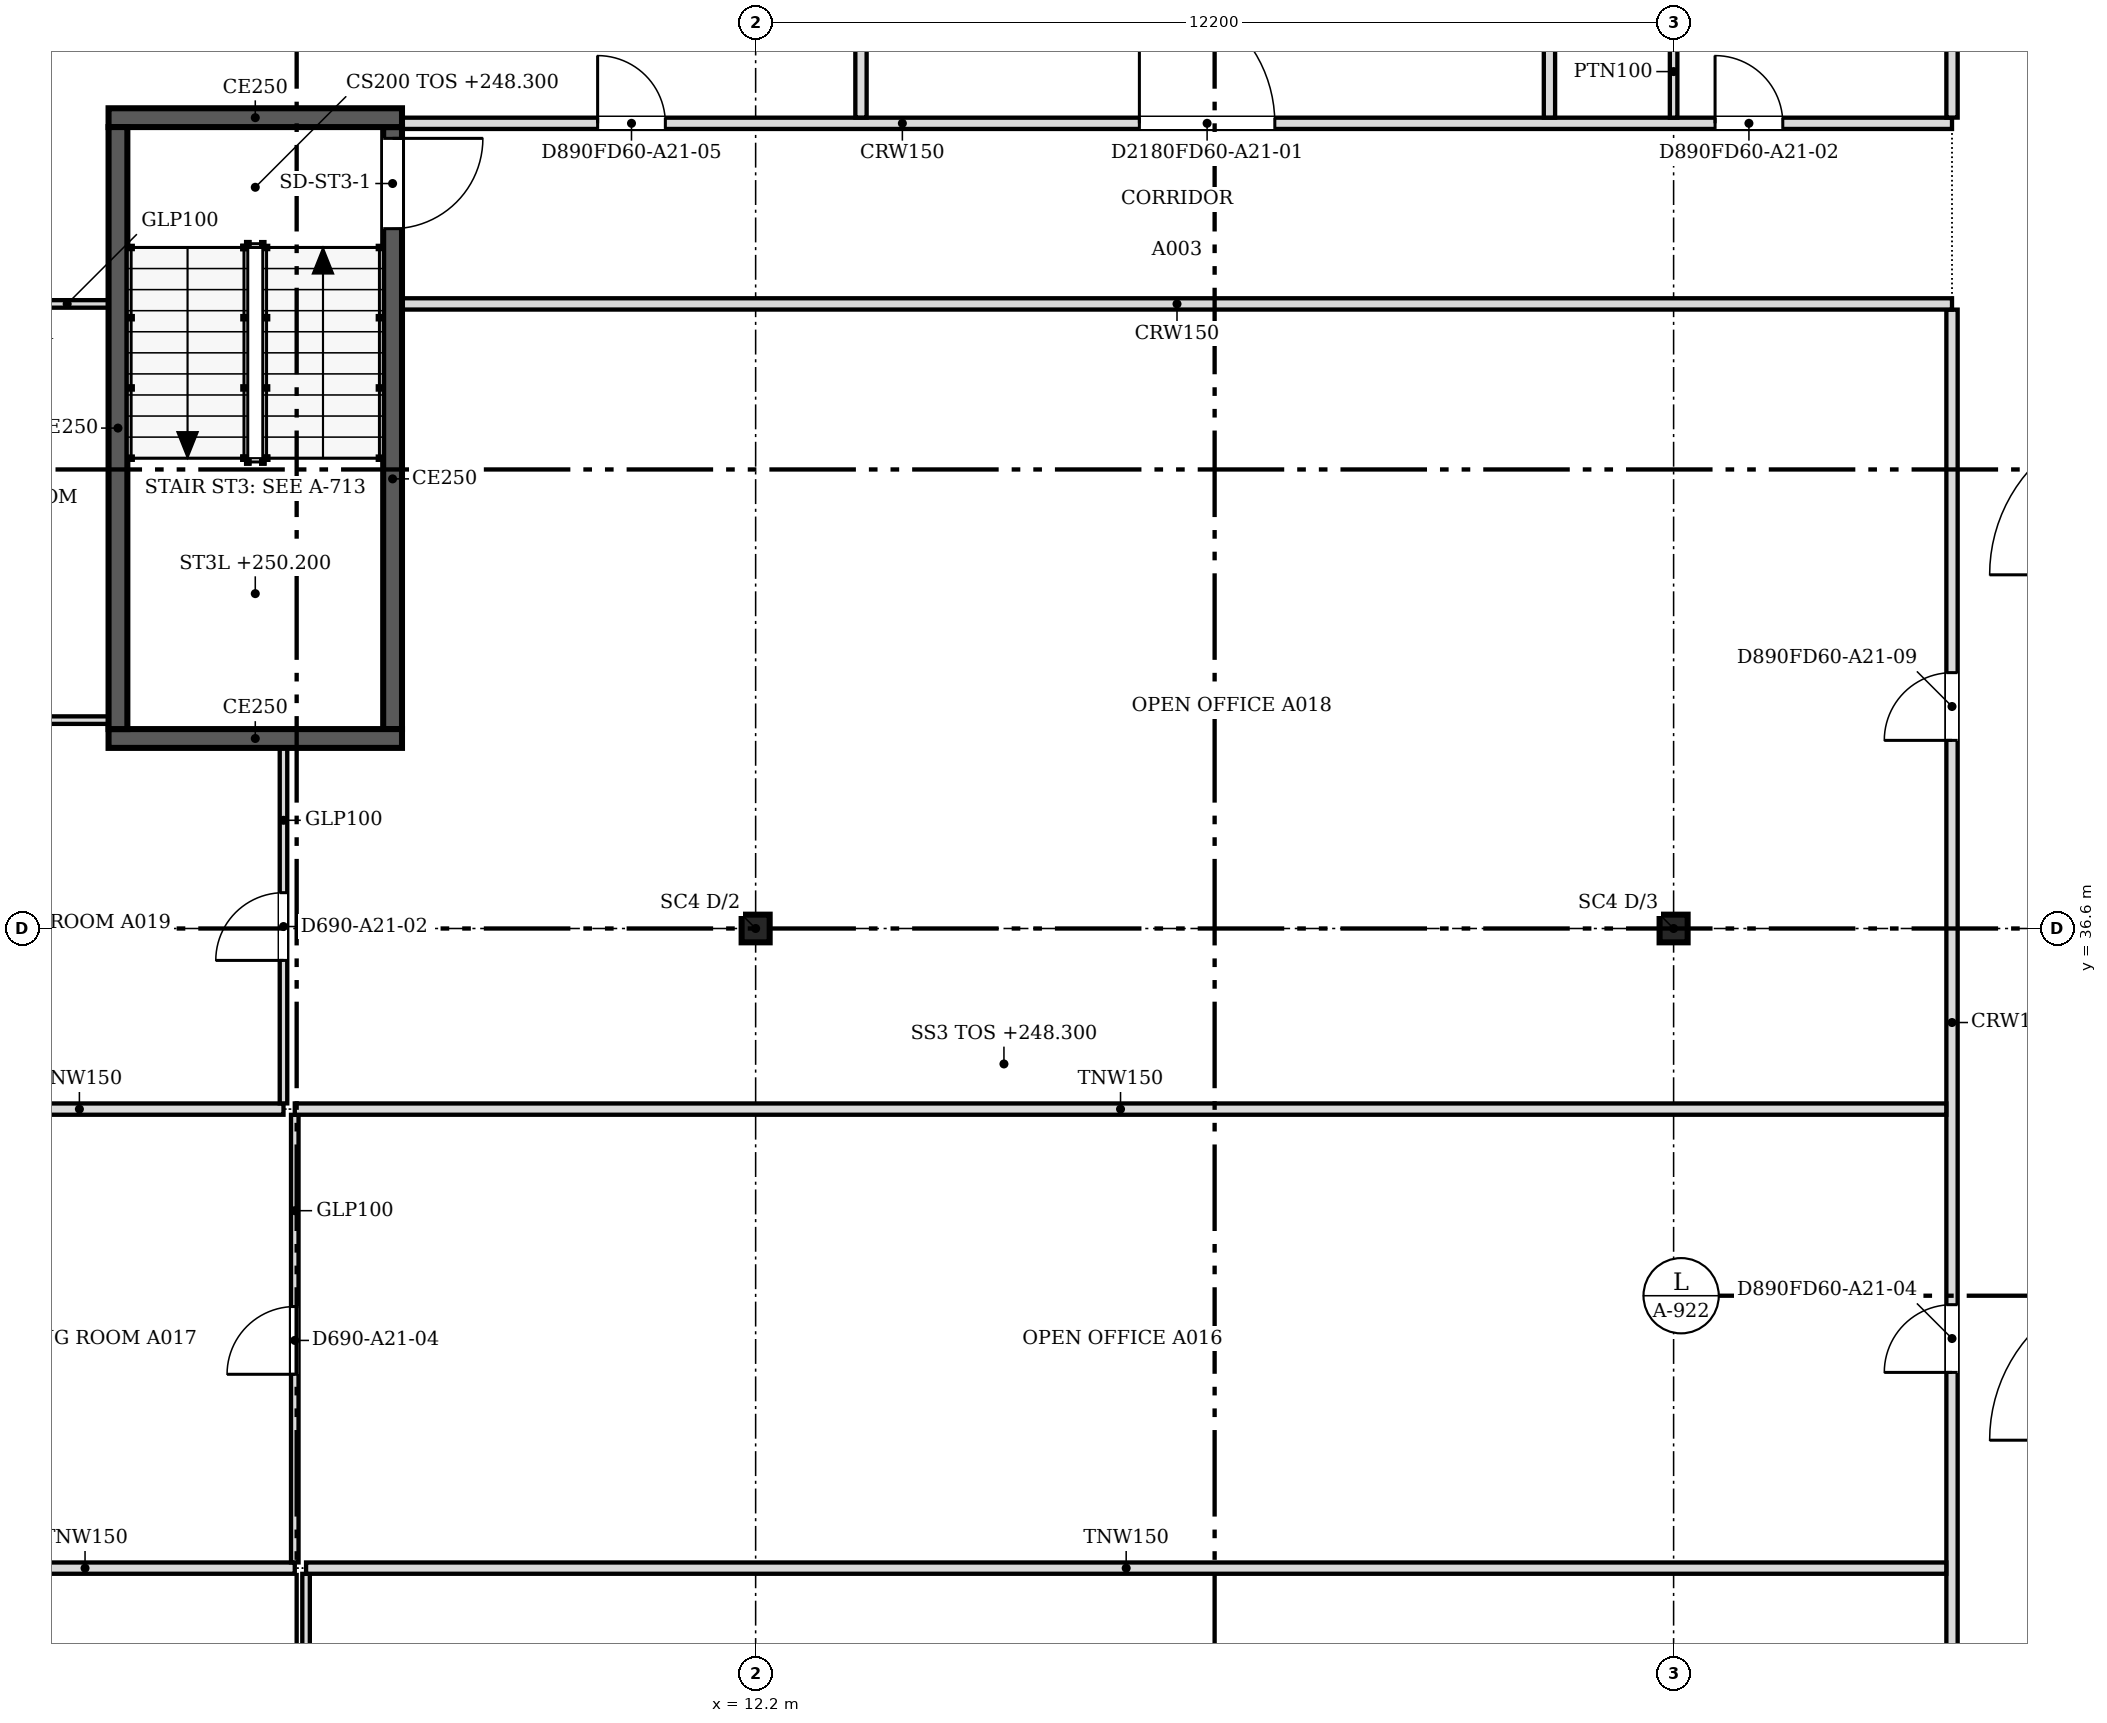
"""IFC4 building model, lengths in metres.
Left out: names, types, materials, properties, quantities, classifications, styles, units other than length and angle.
Written with IfcOpenShell. Run it as: python <this file> out.ifc"""

import sys

from ifc_helpers import new_model, si_unit, direction, frame, frame_2d, origin, origin_2d, place, context, subcontext, project, spatial, rectangle, i_section, extrude, source, transform, mapped, element, fill, save


model = new_model("IFC4")
c1 = context("Model", 3, precision=1e-05, world=origin(), true_north=direction((0.0, 1.0)))
c2 = subcontext(c1, "Body", "Model", "MODEL_VIEW")
j1 = project(units=[si_unit("LENGTHUNIT", "METRE"), si_unit("PLANEANGLEUNIT", "RADIAN")], contexts=[c1])
p1 = place(None, origin())
s1 = spatial("IfcSite", under=j1, at=p1, CompositionType="ELEMENT")
p2 = place(p1, origin())
s2 = spatial("IfcBuilding", under=s1, at=p2, CompositionType="ELEMENT")
p3 = place(p2, frame((0.0, 0.0, 248.3)))
s3 = spatial("IfcBuildingStorey", under=s2, at=p3, CompositionType="ELEMENT", Elevation=248.3)
for number, where, z_axis, x_axis in (
    (1, (12.2, 36.6, 0.0), (0.0, 0.0, 1.0), (1.0, 0.0, 0.0)),
    (2, (24.4, 36.6, 0.0), (0.0, 0.0, 1.0), (1.0, 0.0, 0.0)),
):
    element("IfcColumn", number, at=place(p3, frame(where, z_axis=z_axis, x_axis=x_axis)), inside=s3, PredefinedType="COLUMN", context=c2, shape_type="SweptSolid", body=[
        extrude(i_section(OverallWidth=0.373, OverallDepth=0.368, WebThickness=0.015, FlangeThickness=0.024, at=origin_2d()), origin(), (0.0, 0.0, 1.0), 3.6),
    ])
p4 = place(p3, frame((7.5, 39.125, 0.0), z_axis=(0.0, 0.0, 1.0), x_axis=(-1.0, 0.0, 0.0)))
e3 = element("IfcWall", 3, at=p4, inside=s3, PredefinedType="SOLIDWALL", context=c2, shape_type="SweptSolid", body=[
    extrude(rectangle(XDim=3.9, YDim=0.25, at=frame_2d((1.95, 0.0))), origin(), (0.0, 0.0, 1.0), 3.8),
])
p5 = place(p3, frame((3.725, 39.25, 0.0), z_axis=(0.0, 0.0, 1.0), x_axis=(0.0, 1.0, 0.0)))
e4 = element("IfcWall", 4, at=p5, inside=s3, PredefinedType="SOLIDWALL", context=c2, shape_type="SweptSolid", body=[
    extrude(rectangle(XDim=8.0, YDim=0.25, at=frame_2d((4.0, 0.0))), origin(), (0.0, 0.0, 1.0), 3.8),
])
p6 = place(p3, frame((3.6, 47.375, 0.0), z_axis=(0.0, 0.0, 1.0), x_axis=(1.0, 0.0, 0.0)))
e5 = element("IfcWall", 5, at=p6, inside=s3, PredefinedType="SOLIDWALL", context=c2, shape_type="SweptSolid", body=[
    extrude(rectangle(XDim=3.9, YDim=0.25, at=frame_2d((1.95, 0.0))), origin(), (0.0, 0.0, 1.0), 3.8),
])
p7 = place(p3, frame((7.375, 47.25, 0.0), z_axis=(0.0, 0.0, 1.0), x_axis=(0.0, -1.0, 0.0)))
e6 = element("IfcWall", 6, at=p7, inside=s3, PredefinedType="SOLIDWALL", context=c2, shape_type="SweptSolid", body=[
    extrude(rectangle(XDim=8.0, YDim=0.25, at=frame_2d((4.0, 0.0))), origin(), (0.0, 0.0, 1.0), 3.8),
])
m1 = source(origin(), c2, "Body", "SweptSolid", [
    extrude(rectangle(XDim=1.2, YDim=2.1, at=frame_2d((0.6, 1.05))), frame((0.0, 0.135, 0.0), z_axis=(0.0, -1.0, 0.0), x_axis=(1.0, 0.0, 0.0)), (0.0, 0.0, 1.0), 0.27),
])
p8 = place(p7, frame((0.15, 0.0, 0.0)))
e7 = element("IfcOpeningElement", 7, at=p8, cuts=e6, PredefinedType="OPENING", context=c2, shape_type="MappedRepresentation", body=[
    mapped(m1, transform((0.0, 0.0, 0.0), scale=1.0)),
])
p9 = place(p3, frame((6.225, 22.0, 0.0), z_axis=(0.0, 0.0, 1.0), x_axis=(0.0, 1.0, 0.0)))
e8 = element("IfcWall", 8, at=p9, inside=s3, PredefinedType="PARTITIONING", context=c2, shape_type="SweptSolid", body=[
    extrude(rectangle(XDim=6.024, YDim=0.1, at=frame_2d((3.012, 0.0))), origin(), (0.0, 0.0, 1.0), 3.067),
])
p10 = place(p3, frame((28.1, 22.076, 0.0), z_axis=(0.0, 0.0, 1.0), x_axis=(0.0, 1.0, 0.0)))
e9 = element("IfcWall", 9, at=p10, inside=s3, PredefinedType="PARTITIONING", context=c2, shape_type="SweptSolid", body=[
    extrude(rectangle(XDim=22.748, YDim=0.15, at=frame_2d((11.374, 0.0))), origin(), (0.0, 0.0, 1.0), 3.067),
])
m2 = source(origin(), c2, "Body", "SweptSolid", [
    extrude(rectangle(XDim=0.9, YDim=2.1, at=frame_2d((0.45, 1.05))), frame((0.0, 0.085, 0.0), z_axis=(0.0, -1.0, 0.0), x_axis=(1.0, 0.0, 0.0)), (0.0, 0.0, 1.0), 0.17),
])
p11 = place(p10, frame((2.6, 0.0, 0.0)))
e10 = element("IfcOpeningElement", 10, at=p11, cuts=e9, PredefinedType="OPENING", context=c2, shape_type="MappedRepresentation", body=[
    mapped(m2, transform((0.0, 0.0, 0.0), scale=1.0)),
])
p12 = place(p10, frame((8.625, 0.0, 0.0)))
e11 = element("IfcOpeningElement", 11, at=p12, cuts=e9, PredefinedType="OPENING", context=c2, shape_type="MappedRepresentation", body=[
    mapped(m2, transform((0.0, 0.0, 0.0), scale=1.0)),
])
p13 = place(p10, frame((17.024, 0.0, 0.0)))
e12 = element("IfcOpeningElement", 12, at=p13, cuts=e9, PredefinedType="OPENING", context=c2, shape_type="MappedRepresentation", body=[
    mapped(m2, transform((0.0, 0.0, 0.0), scale=1.0)),
])
p14 = place(p3, frame((0.5, 28.1, 0.0), z_axis=(0.0, 0.0, 1.0), x_axis=(1.0, 0.0, 0.0)))
e13 = element("IfcWall", 13, at=p14, inside=s3, PredefinedType="PARTITIONING", context=c2, shape_type="SweptSolid", body=[
    extrude(rectangle(XDim=5.575, YDim=0.15, at=frame_2d((2.788, 0.0))), origin(), (0.0, 0.0, 1.0), 3.067),
])
p15 = place(p3, frame((6.225, 28.1, 0.0), z_axis=(0.0, 0.0, 1.0), x_axis=(1.0, 0.0, 0.0)))
e14 = element("IfcWall", 14, at=p15, inside=s3, PredefinedType="PARTITIONING", context=c2, shape_type="SweptSolid", body=[
    extrude(rectangle(XDim=21.799, YDim=0.15, at=frame_2d((10.899, 0.0))), origin(), (0.0, 0.0, 1.0), 3.067),
])
p16 = place(p3, frame((6.075, 28.176, 0.0), z_axis=(0.0, 0.0, 1.0), x_axis=(0.0, 1.0, 0.0)))
e15 = element("IfcWall", 15, at=p16, inside=s3, PredefinedType="PARTITIONING", context=c2, shape_type="SweptSolid", body=[
    extrude(rectangle(XDim=5.948, YDim=0.1, at=frame_2d((2.974, 0.0))), origin(), (0.0, 0.0, 1.0), 3.067),
])
m3 = source(origin(), c2, "Body", "SweptSolid", [
    extrude(rectangle(XDim=0.9, YDim=2.1, at=frame_2d((0.45, 1.05))), frame((0.0, 0.06, 0.0), z_axis=(0.0, -1.0, 0.0), x_axis=(1.0, 0.0, 0.0)), (0.0, 0.0, 1.0), 0.12),
])
p17 = place(p16, frame((2.5, 0.0, 0.0)))
e16 = element("IfcOpeningElement", 16, at=p17, cuts=e15, PredefinedType="OPENING", context=c2, shape_type="MappedRepresentation", body=[
    mapped(m3, transform((0.0, 0.0, 0.0), scale=1.0)),
])
p18 = place(p3, frame((0.5, 34.2, 0.0), z_axis=(0.0, 0.0, 1.0), x_axis=(1.0, 0.0, 0.0)))
e17 = element("IfcWall", 17, at=p18, inside=s3, PredefinedType="PARTITIONING", context=c2, shape_type="SweptSolid", body=[
    extrude(rectangle(XDim=5.425, YDim=0.15, at=frame_2d((2.712, 0.0))), origin(), (0.0, 0.0, 1.0), 3.067),
])
p19 = place(p3, frame((6.075, 34.2, 0.0), z_axis=(0.0, 0.0, 1.0), x_axis=(1.0, 0.0, 0.0)))
e18 = element("IfcWall", 18, at=p19, inside=s3, PredefinedType="PARTITIONING", context=c2, shape_type="SweptSolid", body=[
    extrude(rectangle(XDim=21.949, YDim=0.15, at=frame_2d((10.975, 0.0))), origin(), (0.0, 0.0, 1.0), 3.067),
])
p20 = place(p3, frame((5.925, 34.276, 0.0), z_axis=(0.0, 0.0, 1.0), x_axis=(0.0, 1.0, 0.0)))
e19 = element("IfcWall", 19, at=p20, inside=s3, PredefinedType="PARTITIONING", context=c2, shape_type="SweptSolid", body=[
    extrude(rectangle(XDim=4.724, YDim=0.1, at=frame_2d((2.362, 0.0))), origin(), (0.0, 0.0, 1.0), 3.067),
])
p21 = place(p20, frame((1.9, 0.0, 0.0)))
e20 = element("IfcOpeningElement", 20, at=p21, cuts=e19, PredefinedType="OPENING", context=c2, shape_type="MappedRepresentation", body=[
    mapped(m3, transform((0.0, 0.0, 0.0), scale=1.0)),
])
p22 = place(p3, frame((0.5, 39.369, 0.0), z_axis=(0.0, 0.0, 1.0), x_axis=(1.0, 0.0, 0.0)))
e21 = element("IfcWall", 21, at=p22, inside=s3, PredefinedType="PARTITIONING", context=c2, shape_type="SweptSolid", body=[
    extrude(rectangle(XDim=3.1, YDim=0.1, at=frame_2d((1.55, 0.0))), origin(), (0.0, 0.0, 1.0), 3.067),
])
p23 = place(p3, frame((3.6, 44.9, 0.0), z_axis=(0.0, 0.0, 1.0), x_axis=(-1.0, 0.0, 0.0)))
e22 = element("IfcWall", 22, at=p23, inside=s3, PredefinedType="PARTITIONING", context=c2, shape_type="SweptSolid", body=[
    extrude(rectangle(XDim=3.1, YDim=0.1, at=frame_2d((1.55, 0.0))), origin(), (0.0, 0.0, 1.0), 3.067),
])
p24 = place(p23, frame((1.1, 0.0, 0.0)))
e23 = element("IfcOpeningElement", 23, at=p24, cuts=e22, PredefinedType="OPENING", context=c2, shape_type="MappedRepresentation", body=[
    mapped(m3, transform((0.0, 0.0, 0.0), scale=1.0)),
])
p25 = place(p3, frame((7.5, 44.9, 0.0), z_axis=(0.0, 0.0, 1.0), x_axis=(1.0, 0.0, 0.0)))
e24 = element("IfcWall", 24, at=p25, inside=s3, PredefinedType="PARTITIONING", context=c2, shape_type="SweptSolid", body=[
    extrude(rectangle(XDim=20.6, YDim=0.15, at=frame_2d((10.3, 0.0))), origin(), (0.0, 0.0, 1.0), 3.067),
])
p26 = place(p3, frame((7.5, 47.3, 0.0), z_axis=(0.0, 0.0, 1.0), x_axis=(1.0, 0.0, 0.0)))
e25 = element("IfcWall", 25, at=p26, inside=s3, PredefinedType="PARTITIONING", context=c2, shape_type="SweptSolid", body=[
    extrude(rectangle(XDim=20.6, YDim=0.15, at=frame_2d((10.3, 0.0))), origin(), (0.0, 0.0, 1.0), 3.067),
])
p27 = place(p26, frame((17.451, 0.0, 0.0)))
e26 = element("IfcOpeningElement", 26, at=p27, cuts=e25, PredefinedType="OPENING", context=c2, shape_type="MappedRepresentation", body=[
    mapped(m2, transform((0.0, 0.0, 0.0), scale=1.0)),
])
p28 = place(p26, frame((2.6, 0.0, 0.0)))
e27 = element("IfcOpeningElement", 27, at=p28, cuts=e25, PredefinedType="OPENING", context=c2, shape_type="MappedRepresentation", body=[
    mapped(m2, transform((0.0, 0.0, 0.0), scale=1.0)),
])
m4 = source(origin(), c2, "Body", "SweptSolid", [
    extrude(rectangle(XDim=1.8, YDim=2.1, at=frame_2d((0.9, 1.05))), frame((0.0, 0.085, 0.0), z_axis=(0.0, -1.0, 0.0), x_axis=(1.0, 0.0, 0.0)), (0.0, 0.0, 1.0), 0.17),
])
p29 = place(p26, frame((9.8, 0.0, 0.0)))
e28 = element("IfcOpeningElement", 28, at=p29, cuts=e25, PredefinedType="OPENING", context=c2, shape_type="MappedRepresentation", body=[
    mapped(m4, transform((0.0, 0.0, 0.0), scale=1.0)),
])
p30 = place(p3, frame((13.6, 47.376, 0.0), z_axis=(0.0, 0.0, 1.0), x_axis=(0.0, 1.0, 0.0)))
e29 = element("IfcWall", 29, at=p30, inside=s3, PredefinedType="PARTITIONING", context=c2, shape_type="SweptSolid", body=[
    extrude(rectangle(XDim=3.274, YDim=0.15, at=frame_2d((1.637, 0.0))), origin(), (0.0, 0.0, 1.0), 3.067),
])
p31 = place(p3, frame((22.75, 47.376, 0.0), z_axis=(0.0, 0.0, 1.0), x_axis=(0.0, 1.0, 0.0)))
e30 = element("IfcWall", 30, at=p31, inside=s3, PredefinedType="PARTITIONING", context=c2, shape_type="SweptSolid", body=[
    extrude(rectangle(XDim=3.124, YDim=0.15, at=frame_2d((1.562, 0.0))), origin(), (0.0, 0.0, 1.0), 3.067),
])
p32 = place(p3, frame((28.1, 47.376, 0.0), z_axis=(0.0, 0.0, 1.0), x_axis=(0.0, 1.0, 0.0)))
e31 = element("IfcWall", 31, at=p32, inside=s3, PredefinedType="PARTITIONING", context=c2, shape_type="SweptSolid", body=[
    extrude(rectangle(XDim=3.748, YDim=0.15, at=frame_2d((1.874, 0.0))), origin(), (0.0, 0.0, 1.0), 3.067),
])
p33 = place(p3, frame((24.4, 48.6, 0.0), z_axis=(0.0, 0.0, 1.0), x_axis=(0.0, -1.0, 0.0)))
e32 = element("IfcWall", 32, at=p33, inside=s3, PredefinedType="PARTITIONING", context=c2, shape_type="SweptSolid", body=[
    extrude(rectangle(XDim=1.225, YDim=0.1, at=frame_2d((0.613, 0.0))), origin(), (0.0, 0.0, 1.0), 3.067),
])
m5 = source(origin(), c2, "Body", "SweptSolid", [
    extrude(rectangle(XDim=1.2, YDim=2.1, at=frame_2d((0.6, 1.05))), frame((0.0, 0.025, 0.0), z_axis=(0.0, -1.0, 0.0), x_axis=(1.0, 0.0, 0.0)), (0.0, 0.0, 1.0), 0.05),
])
p34 = place(p8, origin())
e33 = element("IfcDoor", 33, at=p34, inside=s3, OperationType="SINGLE_SWING_LEFT", PredefinedType="DOOR", context=c2, shape_type="MappedRepresentation", body=[
    mapped(m5, transform((0.0, 0.0, 0.0), scale=1.0)),
])
fill(e7, e33)
m6 = source(origin(), c2, "Body", "SweptSolid", [
    extrude(rectangle(XDim=0.9, YDim=2.1, at=frame_2d((0.45, 1.05))), frame((0.0, 0.025, 0.0), z_axis=(0.0, -1.0, 0.0), x_axis=(1.0, 0.0, 0.0)), (0.0, 0.0, 1.0), 0.05),
])
p35 = place(p21, origin())
e34 = element("IfcDoor", 34, at=p35, inside=s3, OperationType="SINGLE_SWING_LEFT", PredefinedType="DOOR", context=c2, shape_type="MappedRepresentation", body=[
    mapped(m6, transform((0.0, 0.0, 0.0), scale=1.0)),
])
fill(e20, e34)
p36 = place(p27, origin())
e35 = element("IfcDoor", 35, at=p36, inside=s3, OperationType="SINGLE_SWING_LEFT", PredefinedType="DOOR", context=c2, shape_type="MappedRepresentation", body=[
    mapped(m6, transform((0.0, 0.0, 0.0), scale=1.0)),
])
fill(e26, e35)
p37 = place(p17, origin())
e36 = element("IfcDoor", 36, at=p37, inside=s3, OperationType="SINGLE_SWING_LEFT", PredefinedType="DOOR", context=c2, shape_type="MappedRepresentation", body=[
    mapped(m6, transform((0.0, 0.0, 0.0), scale=1.0)),
])
fill(e16, e36)
p38 = place(p12, origin())
e37 = element("IfcDoor", 37, at=p38, inside=s3, OperationType="SINGLE_SWING_LEFT", PredefinedType="DOOR", context=c2, shape_type="MappedRepresentation", body=[
    mapped(m6, transform((0.0, 0.0, 0.0), scale=1.0)),
])
fill(e11, e37)
p39 = place(p28, origin())
e38 = element("IfcDoor", 38, at=p39, inside=s3, OperationType="SINGLE_SWING_LEFT", PredefinedType="DOOR", context=c2, shape_type="MappedRepresentation", body=[
    mapped(m6, transform((0.0, 0.0, 0.0), scale=1.0)),
])
fill(e27, e38)
m7 = source(origin(), c2, "Body", "SweptSolid", [
    extrude(rectangle(XDim=1.8, YDim=2.1, at=frame_2d((0.9, 1.05))), frame((0.0, 0.025, 0.0), z_axis=(0.0, -1.0, 0.0), x_axis=(1.0, 0.0, 0.0)), (0.0, 0.0, 1.0), 0.05),
])
p40 = place(p29, origin())
e39 = element("IfcDoor", 39, at=p40, inside=s3, OperationType="DOUBLE_DOOR_SINGLE_SWING", PredefinedType="DOOR", context=c2, shape_type="MappedRepresentation", body=[
    mapped(m7, transform((0.0, 0.0, 0.0), scale=1.0)),
])
fill(e28, e39)
p41 = place(p13, origin())
e40 = element("IfcDoor", 40, at=p41, inside=s3, OperationType="SINGLE_SWING_LEFT", PredefinedType="DOOR", context=c2, shape_type="MappedRepresentation", body=[
    mapped(m6, transform((0.0, 0.0, 0.0), scale=1.0)),
])
fill(e12, e40)
save(model, sys.argv[1])
